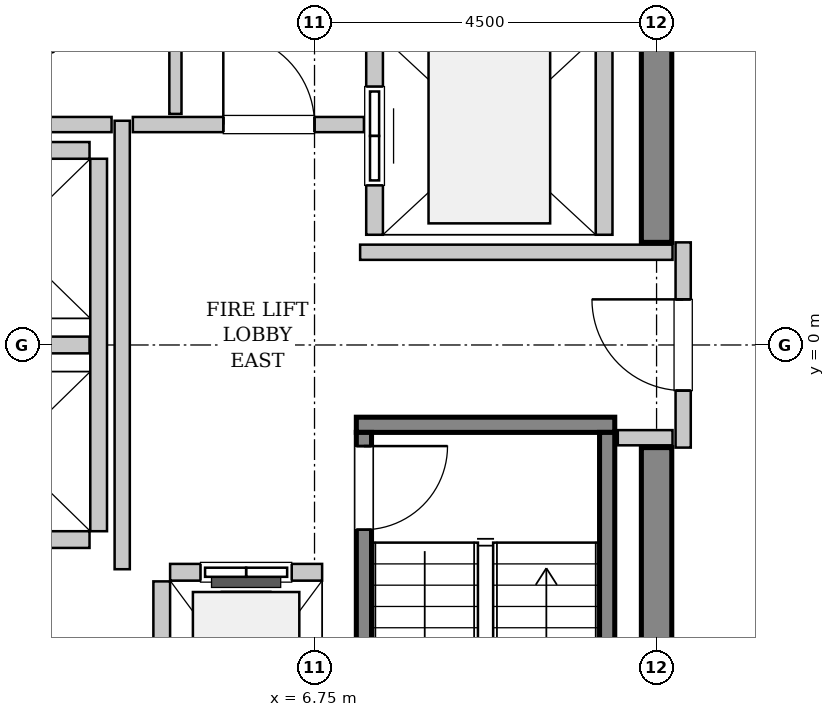
"""IFC4 building model, lengths in metres.
Left out: names, types, materials, properties, quantities, classifications, styles, units other than length and angle.
Written with IfcOpenShell. Run it as: python <this file> out.ifc"""

import sys

from ifc_helpers import new_model, si_unit, direction, frame, frame_2d, origin, place, context, subcontext, project, spatial, rectangle, extrude, source, transform, mapped, element, fill, save


model = new_model("IFC4")
c1 = context("Model", 3, precision=1e-05, world=origin(), true_north=direction((0.0, 1.0)))
c2 = subcontext(c1, "Body", "Model", "MODEL_VIEW")
j1 = project(units=[si_unit("LENGTHUNIT", "METRE"), si_unit("PLANEANGLEUNIT", "RADIAN")], contexts=[c1])
p1 = place(None, origin())
s1 = spatial("IfcSite", under=j1, at=p1, CompositionType="ELEMENT")
p2 = place(p1, origin())
s2 = spatial("IfcBuilding", under=s1, at=p2, CompositionType="ELEMENT")
p3 = place(p2, frame((0.0, 0.0, 333.8)))
s3 = spatial("IfcBuildingStorey", under=s2, at=p3, CompositionType="ELEMENT", Elevation=333.8)
m1 = source(origin(), c2, "Body", "SweptSolid", [
    extrude(rectangle(XDim=7.45, YDim=0.4, at=frame_2d((3.725, 0.0))), origin(), (0.0, 0.0, 1.0), 3.8),
])
for number, where, z_axis, x_axis in (
    (1, (11.25, -8.8, 0.0), (0.0, 0.0, 1.0), (0.0, 1.0, 0.0)),
    (2, (11.25, 1.35, 0.0), (0.0, 0.0, 1.0), (0.0, 1.0, 0.0)),
):
    element("IfcWall", number, at=place(p3, frame(where, z_axis=z_axis, x_axis=x_axis)), inside=s3, PredefinedType="SHEAR", context=c2, shape_type="MappedRepresentation", body=[
        mapped(m1, transform((0.0, 0.0, 0.0), x_axis=(1.0, 0.0, 0.0), y_axis=(0.0, 1.0, 0.0), z_axis=(0.0, 0.0, 1.0), scale=1.0)),
    ])
m2 = source(origin(), c2, "Body", "SweptSolid", [
    extrude(rectangle(XDim=3.4, YDim=0.2, at=frame_2d((1.7, 0.0))), origin(), (0.0, 0.0, 1.0), 3.8),
])
p4 = place(p3, frame((7.3, -1.05, 0.0), z_axis=(0.0, 0.0, 1.0), x_axis=(1.0, 0.0, 0.0)))
e3 = element("IfcWall", 3, at=p4, inside=s3, PredefinedType="SOLIDWALL", context=c2, shape_type="MappedRepresentation", body=[
    mapped(m2, transform((0.0, 0.0, 0.0), x_axis=(1.0, 0.0, 0.0), y_axis=(0.0, 1.0, 0.0), z_axis=(0.0, 0.0, 1.0), scale=1.0)),
])
m3 = source(origin(), c2, "Body", "SweptSolid", [
    extrude(rectangle(XDim=7.1, YDim=0.2, at=frame_2d((3.55, 0.0))), origin(), (0.0, 0.0, 1.0), 3.8),
])
p5 = place(p3, frame((7.4, -1.15, 0.0), z_axis=(0.0, 0.0, 1.0), x_axis=(0.0, -1.0, 0.0)))
e4 = element("IfcWall", 4, at=p5, inside=s3, PredefinedType="SOLIDWALL", context=c2, shape_type="MappedRepresentation", body=[
    mapped(m3, transform((0.0, 0.0, 0.0), x_axis=(1.0, 0.0, 0.0), y_axis=(0.0, 1.0, 0.0), z_axis=(0.0, 0.0, 1.0), scale=1.0)),
])
p6 = place(p5, frame((0.18, 0.0, 0.0)))
e5 = element("IfcOpeningElement", 5, at=p6, cuts=e4, PredefinedType="OPENING", context=c2, shape_type="SweptSolid", body=[
    extrude(rectangle(XDim=1.1, YDim=2.15, at=frame_2d((0.55, 1.075))), frame((0.0, 0.11, 0.0), z_axis=(0.0, -1.0, 0.0), x_axis=(1.0, 0.0, 0.0)), (0.0, 0.0, 1.0), 0.22),
])
p7 = place(p3, frame((10.6, -1.15, 0.0), z_axis=(0.0, 0.0, 1.0), x_axis=(0.0, -1.0, 0.0)))
e6 = element("IfcWall", 6, at=p7, inside=s3, PredefinedType="SOLIDWALL", context=c2, shape_type="MappedRepresentation", body=[
    mapped(m3, transform((0.0, 0.0, 0.0), x_axis=(1.0, 0.0, 0.0), y_axis=(0.0, 1.0, 0.0), z_axis=(0.0, 0.0, 1.0), scale=1.0)),
])
m4 = source(origin(), c2, "Body", "SweptSolid", [
    extrude(rectangle(XDim=2.0, YDim=0.22, at=frame_2d((1.0, 0.0))), origin(), (0.0, 0.0, 1.0), 3.535),
])
p8 = place(p3, frame((6.85, -2.99, 0.0), z_axis=(0.0, 0.0, 1.0), x_axis=(-1.0, 0.0, 0.0)))
e7 = element("IfcWall", 7, at=p8, inside=s3, PredefinedType="SOLIDWALL", context=c2, shape_type="MappedRepresentation", body=[
    mapped(m4, transform((0.0, 0.0, 0.0), x_axis=(1.0, 0.0, 0.0), y_axis=(0.0, 1.0, 0.0), z_axis=(0.0, 0.0, 1.0), scale=1.0)),
])
p9 = place(p8, frame((0.4, 0.0, 0.0)))
e8 = element("IfcOpeningElement", 8, at=p9, cuts=e7, PredefinedType="OPENING", context=c2, shape_type="SweptSolid", body=[
    extrude(rectangle(XDim=1.2, YDim=2.2, at=frame_2d((0.6, 1.1))), frame((0.0, 0.12, 0.0), z_axis=(0.0, -1.0, 0.0), x_axis=(1.0, 0.0, 0.0)), (0.0, 0.0, 1.0), 0.24),
])
m5 = source(origin(), c2, "Body", "SweptSolid", [
    extrude(rectangle(XDim=2.68, YDim=0.22, at=frame_2d((1.34, 0.0))), origin(), (0.0, 0.0, 1.0), 3.535),
])
p10 = place(p3, frame((4.74, -3.11, 0.0), z_axis=(0.0, 0.0, 1.0), x_axis=(0.0, -1.0, 0.0)))
e9 = element("IfcWall", 9, at=p10, inside=s3, PredefinedType="SOLIDWALL", context=c2, shape_type="MappedRepresentation", body=[
    mapped(m5, transform((0.0, 0.0, 0.0), x_axis=(1.0, 0.0, 0.0), y_axis=(0.0, 1.0, 0.0), z_axis=(0.0, 0.0, 1.0), scale=1.0)),
])
m6 = source(origin(), c2, "Body", "SweptSolid", [
    extrude(rectangle(XDim=5.45, YDim=0.22, at=frame_2d((2.725, 0.0))), origin(), (0.0, 0.0, 1.0), 3.535),
])
p11 = place(p3, frame((7.54, 6.9, 0.0), z_axis=(0.0, 0.0, 1.0), x_axis=(0.0, -1.0, 0.0)))
e10 = element("IfcWall", 10, at=p11, inside=s3, PredefinedType="SOLIDWALL", context=c2, shape_type="MappedRepresentation", body=[
    mapped(m6, transform((0.0, 0.0, 0.0), x_axis=(1.0, 0.0, 0.0), y_axis=(0.0, 1.0, 0.0), z_axis=(0.0, 0.0, 1.0), scale=1.0)),
])
p12 = place(p11, frame((3.5, 0.0, 0.0)))
e11 = element("IfcOpeningElement", 11, at=p12, cuts=e10, PredefinedType="OPENING", context=c2, shape_type="SweptSolid", body=[
    extrude(rectangle(XDim=1.3, YDim=2.3, at=frame_2d((0.65, 1.15))), frame((0.0, 0.12, 0.0), z_axis=(0.0, -1.0, 0.0), x_axis=(1.0, 0.0, 0.0)), (0.0, 0.0, 1.0), 0.24),
])
p13 = place(p11, frame((0.65, 0.0, 0.0)))
e12 = element("IfcOpeningElement", 12, at=p13, cuts=e10, PredefinedType="OPENING", context=c2, shape_type="SweptSolid", body=[
    extrude(rectangle(XDim=1.3, YDim=2.3, at=frame_2d((0.65, 1.15))), frame((0.0, 0.12, 0.0), z_axis=(0.0, -1.0, 0.0), x_axis=(1.0, 0.0, 0.0)), (0.0, 0.0, 1.0), 0.24),
])
p14 = place(p3, frame((10.56, 1.45, 0.0), z_axis=(0.0, 0.0, 1.0), x_axis=(0.0, 1.0, 0.0)))
e13 = element("IfcWall", 13, at=p14, inside=s3, PredefinedType="SOLIDWALL", context=c2, shape_type="MappedRepresentation", body=[
    mapped(m6, transform((0.0, 0.0, 0.0), x_axis=(1.0, 0.0, 0.0), y_axis=(0.0, 1.0, 0.0), z_axis=(0.0, 0.0, 1.0), scale=1.0)),
])
m7 = source(origin(), c2, "Body", "SweptSolid", [
    extrude(rectangle(XDim=4.9, YDim=0.22, at=frame_2d((2.45, 0.0))), origin(), (0.0, 0.0, 1.0), 3.535),
])
p15 = place(p3, frame((3.91, -2.45, 0.0), z_axis=(0.0, 0.0, 1.0), x_axis=(0.0, 1.0, 0.0)))
e14 = element("IfcWall", 14, at=p15, inside=s3, PredefinedType="SOLIDWALL", context=c2, shape_type="MappedRepresentation", body=[
    mapped(m7, transform((0.0, 0.0, 0.0), x_axis=(1.0, 0.0, 0.0), y_axis=(0.0, 1.0, 0.0), z_axis=(0.0, 0.0, 1.0), scale=1.0)),
])
m8 = source(origin(), c2, "Body", "SweptSolid", [
    extrude(rectangle(XDim=2.13, YDim=0.22, at=frame_2d((1.065, 0.0))), origin(), (0.0, 0.0, 1.0), 3.535),
])
for number, where, z_axis, x_axis in (
    (15, (1.66, -2.56, 0.0), (0.0, 0.0, 1.0), (1.0, 0.0, 0.0)),
    (16, (1.66, 0.0, 0.0), (0.0, 0.0, 1.0), (1.0, 0.0, 0.0)),
    (17, (3.79, 2.56, 0.0), (0.0, 0.0, 1.0), (-1.0, 0.0, 0.0)),
):
    element("IfcWall", number, at=place(p3, frame(where, z_axis=z_axis, x_axis=x_axis)), inside=s3, PredefinedType="SOLIDWALL", context=c2, shape_type="MappedRepresentation", body=[
        mapped(m8, transform((0.0, 0.0, 0.0), x_axis=(1.0, 0.0, 0.0), y_axis=(0.0, 1.0, 0.0), z_axis=(0.0, 0.0, 1.0), scale=1.0)),
    ])
m9 = source(origin(), c2, "Body", "SweptSolid", [
    extrude(rectangle(XDim=2.7, YDim=0.2, at=frame_2d((1.35, 0.0))), origin(), (0.0, 0.0, 1.0), 2.625),
])
p16 = place(p3, frame((11.6, -1.35, 0.0), z_axis=(0.0, 0.0, 1.0), x_axis=(0.0, 1.0, 0.0)))
e18 = element("IfcWall", 18, at=p16, inside=s3, PredefinedType="PARTITIONING", context=c2, shape_type="MappedRepresentation", body=[
    mapped(m9, transform((0.0, 0.0, 0.0), x_axis=(1.0, 0.0, 0.0), y_axis=(0.0, 1.0, 0.0), z_axis=(0.0, 0.0, 1.0), scale=1.0)),
])
p17 = place(p16, frame((0.75, 0.0, 0.0)))
e19 = element("IfcOpeningElement", 19, at=p17, cuts=e18, PredefinedType="OPENING", context=c2, shape_type="SweptSolid", body=[
    extrude(rectangle(XDim=1.2, YDim=2.15, at=frame_2d((0.6, 1.075))), frame((0.0, 0.11, 0.0), z_axis=(0.0, -1.0, 0.0), x_axis=(1.0, 0.0, 0.0)), (0.0, 0.0, 1.0), 0.22),
])
m10 = source(origin(), c2, "Body", "SweptSolid", [
    extrude(rectangle(XDim=5.9, YDim=0.2, at=frame_2d((2.95, 0.0))), origin(), (0.0, 0.0, 1.0), 3.535),
])
p18 = place(p3, frame((4.22, -2.95, 0.0), z_axis=(0.0, 0.0, 1.0), x_axis=(0.0, 1.0, 0.0)))
e20 = element("IfcWall", 20, at=p18, inside=s3, PredefinedType="PARTITIONING", context=c2, shape_type="MappedRepresentation", body=[
    mapped(m10, transform((0.0, 0.0, 0.0), x_axis=(1.0, 0.0, 0.0), y_axis=(0.0, 1.0, 0.0), z_axis=(0.0, 0.0, 1.0), scale=1.0)),
])
m11 = source(origin(), c2, "Body", "SweptSolid", [
    extrude(rectangle(XDim=2.52, YDim=0.2, at=frame_2d((1.26, 0.0))), origin(), (0.0, 0.0, 1.0), 3.535),
])
p19 = place(p3, frame((1.56, 2.9, 0.0), z_axis=(0.0, 0.0, 1.0), x_axis=(1.0, 0.0, 0.0)))
e21 = element("IfcWall", 21, at=p19, inside=s3, PredefinedType="PARTITIONING", context=c2, shape_type="MappedRepresentation", body=[
    mapped(m11, transform((0.0, 0.0, 0.0), x_axis=(1.0, 0.0, 0.0), y_axis=(0.0, 1.0, 0.0), z_axis=(0.0, 0.0, 1.0), scale=1.0)),
])
m12 = source(origin(), c2, "Body", "SweptSolid", [
    extrude(rectangle(XDim=3.04, YDim=0.2, at=frame_2d((1.52, 0.0))), origin(), (0.0, 0.0, 1.0), 3.535),
])
p20 = place(p3, frame((4.36, 2.9, 0.0), z_axis=(0.0, 0.0, 1.0), x_axis=(1.0, 0.0, 0.0)))
e22 = element("IfcWall", 22, at=p20, inside=s3, PredefinedType="PARTITIONING", context=c2, shape_type="MappedRepresentation", body=[
    mapped(m12, transform((0.0, 0.0, 0.0), x_axis=(1.0, 0.0, 0.0), y_axis=(0.0, 1.0, 0.0), z_axis=(0.0, 0.0, 1.0), scale=1.0)),
])
p21 = place(p20, frame((1.19, 0.0, 0.0)))
e23 = element("IfcOpeningElement", 23, at=p21, cuts=e22, PredefinedType="OPENING", context=c2, shape_type="SweptSolid", body=[
    extrude(rectangle(XDim=1.2, YDim=2.15, at=frame_2d((0.6, 1.075))), frame((0.0, 0.11, 0.0), z_axis=(0.0, -1.0, 0.0), x_axis=(1.0, 0.0, 0.0)), (0.0, 0.0, 1.0), 0.22),
])
m13 = source(origin(), c2, "Body", "SweptSolid", [
    extrude(rectangle(XDim=4.11, YDim=0.2, at=frame_2d((2.055, 0.0))), origin(), (0.0, 0.0, 1.0), 3.535),
])
p22 = place(p3, frame((7.35, 1.22, 0.0), z_axis=(0.0, 0.0, 1.0), x_axis=(1.0, 0.0, 0.0)))
e24 = element("IfcWall", 24, at=p22, inside=s3, PredefinedType="PARTITIONING", context=c2, shape_type="MappedRepresentation", body=[
    mapped(m13, transform((0.0, 0.0, 0.0), x_axis=(1.0, 0.0, 0.0), y_axis=(0.0, 1.0, 0.0), z_axis=(0.0, 0.0, 1.0), scale=1.0)),
])
m14 = source(origin(), c2, "Body", "SweptSolid", [
    extrude(rectangle(XDim=0.72, YDim=0.2, at=frame_2d((0.36, 0.0))), origin(), (0.0, 0.0, 1.0), 3.535),
])
p23 = place(p3, frame((10.74, -1.22, 0.0), z_axis=(0.0, 0.0, 1.0), x_axis=(1.0, 0.0, 0.0)))
e25 = element("IfcWall", 25, at=p23, inside=s3, PredefinedType="PARTITIONING", context=c2, shape_type="MappedRepresentation", body=[
    mapped(m14, transform((0.0, 0.0, 0.0), x_axis=(1.0, 0.0, 0.0), y_axis=(0.0, 1.0, 0.0), z_axis=(0.0, 0.0, 1.0), scale=1.0)),
])
m15 = source(origin(), c2, "Body", "SweptSolid", [
    extrude(rectangle(XDim=5.45, YDim=0.16, at=frame_2d((2.725, 0.0))), origin(), (0.0, 0.0, 1.0), 3.535),
])
p24 = place(p3, frame((4.92, 3.04, 0.0), z_axis=(0.0, 0.0, 1.0), x_axis=(0.0, 1.0, 0.0)))
e26 = element("IfcWall", 26, at=p24, inside=s3, PredefinedType="PARTITIONING", context=c2, shape_type="MappedRepresentation", body=[
    mapped(m15, transform((0.0, 0.0, 0.0), x_axis=(1.0, 0.0, 0.0), y_axis=(0.0, 1.0, 0.0), z_axis=(0.0, 0.0, 1.0), scale=1.0)),
])
m16 = source(origin(), c2, "Body", "SweptSolid", [
    extrude(rectangle(XDim=1.1, YDim=2.15, at=frame_2d((0.55, 1.075))), frame((0.0, 0.025, 0.0), z_axis=(0.0, -1.0, 0.0), x_axis=(1.0, 0.0, 0.0)), (0.0, 0.0, 1.0), 0.05),
])
p25 = place(p6, origin())
e27 = element("IfcDoor", 27, at=p25, inside=s3, OperationType="SINGLE_SWING_LEFT", PredefinedType="DOOR", context=c2, shape_type="MappedRepresentation", body=[
    mapped(m16, transform((0.0, 0.0, 0.0), x_axis=(1.0, 0.0, 0.0), y_axis=(0.0, 1.0, 0.0), z_axis=(0.0, 0.0, 1.0), scale=1.0)),
])
fill(e5, e27)
m17 = source(origin(), c2, "Body", "SweptSolid", [
    extrude(rectangle(XDim=1.2, YDim=2.2, at=frame_2d((0.6, 1.1))), frame((0.0, 0.025, 0.0), z_axis=(0.0, -1.0, 0.0), x_axis=(1.0, 0.0, 0.0)), (0.0, 0.0, 1.0), 0.05),
])
p26 = place(p9, origin())
e28 = element("IfcDoor", 28, at=p26, inside=s3, OperationType="SLIDING_TO_LEFT", PredefinedType="DOOR", context=c2, shape_type="MappedRepresentation", body=[
    mapped(m17, transform((0.0, 0.0, 0.0), x_axis=(1.0, 0.0, 0.0), y_axis=(0.0, 1.0, 0.0), z_axis=(0.0, 0.0, 1.0), scale=1.0)),
])
fill(e8, e28)
m18 = source(origin(), c2, "Body", "SweptSolid", [
    extrude(rectangle(XDim=1.3, YDim=2.3, at=frame_2d((0.65, 1.15))), frame((0.0, 0.025, 0.0), z_axis=(0.0, -1.0, 0.0), x_axis=(1.0, 0.0, 0.0)), (0.0, 0.0, 1.0), 0.05),
])
p27 = place(p12, origin())
e29 = element("IfcDoor", 29, at=p27, inside=s3, OperationType="SLIDING_TO_RIGHT", PredefinedType="DOOR", context=c2, shape_type="MappedRepresentation", body=[
    mapped(m18, transform((0.0, 0.0, 0.0), x_axis=(1.0, 0.0, 0.0), y_axis=(0.0, 1.0, 0.0), z_axis=(0.0, 0.0, 1.0), scale=1.0)),
])
fill(e11, e29)
m19 = source(origin(), c2, "Body", "SweptSolid", [
    extrude(rectangle(XDim=1.2, YDim=2.15, at=frame_2d((0.6, 1.075))), frame((0.0, 0.025, 0.0), z_axis=(0.0, -1.0, 0.0), x_axis=(1.0, 0.0, 0.0)), (0.0, 0.0, 1.0), 0.05),
])
p28 = place(p17, origin())
e30 = element("IfcDoor", 30, at=p28, inside=s3, OperationType="SINGLE_SWING_RIGHT", PredefinedType="DOOR", context=c2, shape_type="MappedRepresentation", body=[
    mapped(m19, transform((0.0, 0.0, 0.0), x_axis=(1.0, 0.0, 0.0), y_axis=(0.0, 1.0, 0.0), z_axis=(0.0, 0.0, 1.0), scale=1.0)),
])
fill(e19, e30)
p29 = place(p21, origin())
e31 = element("IfcDoor", 31, at=p29, inside=s3, OperationType="SINGLE_SWING_LEFT", PredefinedType="DOOR", context=c2, shape_type="MappedRepresentation", body=[
    mapped(m19, transform((0.0, 0.0, 0.0), x_axis=(1.0, 0.0, 0.0), y_axis=(0.0, 1.0, 0.0), z_axis=(0.0, 0.0, 1.0), scale=1.0)),
])
fill(e23, e31)
save(model, sys.argv[1])
